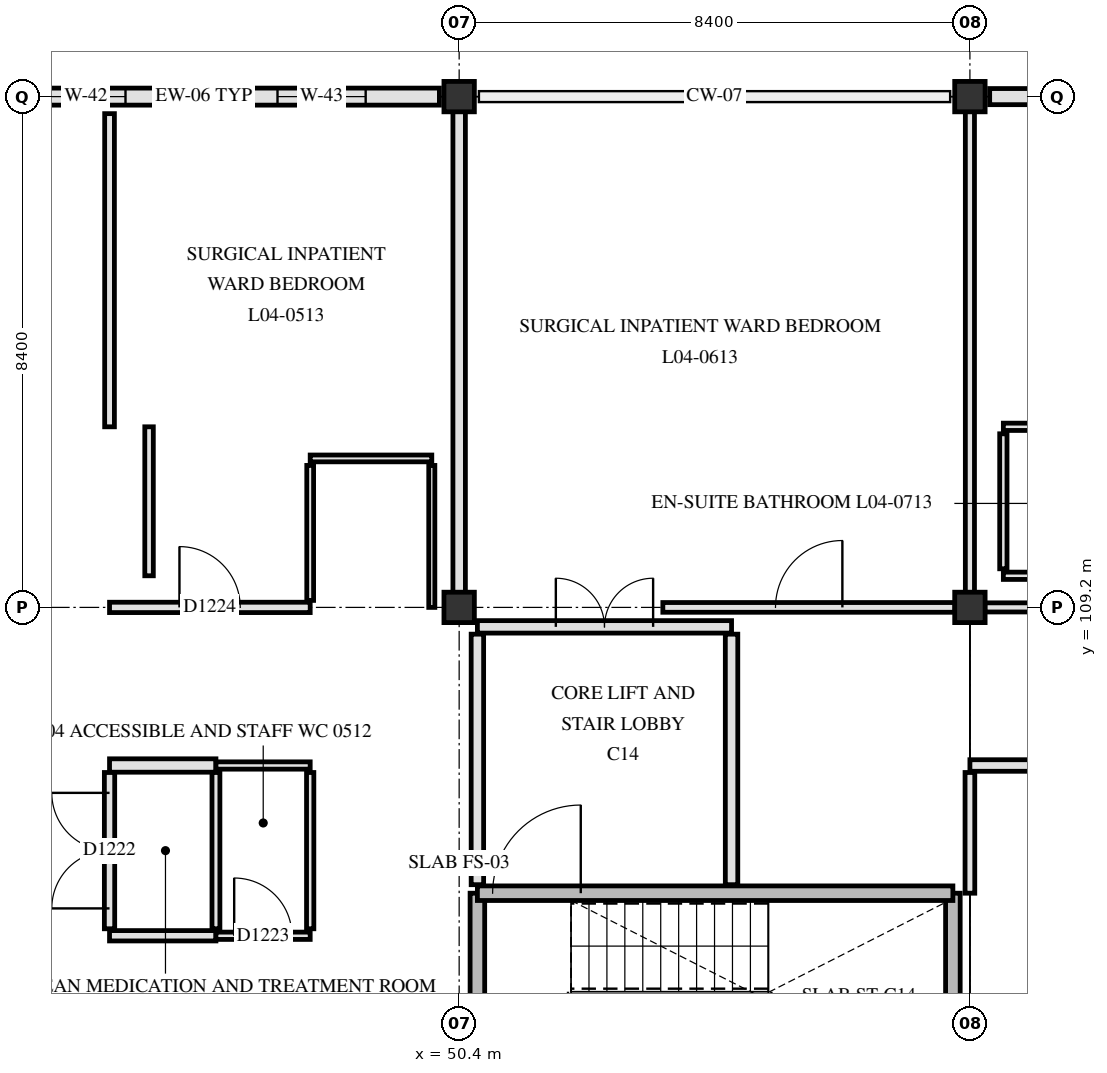
"""IFC4 building model, lengths in metres.
Left out: names, types, materials, properties, quantities, classifications, styles, units other than length and angle.
Written with IfcOpenShell. Run it as: python <this file> out.ifc"""

import sys

from ifc_helpers import new_model, si_unit, direction, frame, frame_2d, origin, origin_2d, place, context, subcontext, project, spatial, rectangle, extrude, element, fill, save


model = new_model("IFC4")
c1 = context("Model", 3, precision=1e-05, world=origin(), true_north=direction((0.0, 1.0)))
c2 = subcontext(c1, "Body", "Model", "MODEL_VIEW")
j1 = project(units=[si_unit("LENGTHUNIT", "METRE"), si_unit("PLANEANGLEUNIT", "RADIAN")], contexts=[c1])
p1 = place(None, origin())
s1 = spatial("IfcSite", under=j1, at=p1, CompositionType="ELEMENT")
p2 = place(p1, origin())
s2 = spatial("IfcBuilding", under=s1, at=p2, CompositionType="ELEMENT")
p3 = place(p2, frame((0.0, 0.0, 18.6)))
s3 = spatial("IfcBuildingStorey", under=s2, at=p3, CompositionType="ELEMENT", Elevation=18.6)
for number, where, z_axis, x_axis in (
    (1, (50.4, 109.2, 0.0), (0.0, 0.0, 1.0), (1.0, 0.0, 0.0)),
    (2, (50.4, 117.6, 0.0), (0.0, 0.0, 1.0), (1.0, 0.0, 0.0)),
    (3, (58.8, 109.2, 0.0), (0.0, 0.0, 1.0), (1.0, 0.0, 0.0)),
    (4, (58.8, 117.6, 0.0), (0.0, 0.0, 1.0), (1.0, 0.0, 0.0)),
):
    element("IfcColumn", number, at=place(p3, frame(where, z_axis=z_axis, x_axis=x_axis)), inside=s3, PredefinedType="COLUMN", context=c2, shape_type="SweptSolid", body=[
        extrude(rectangle(XDim=0.5, YDim=0.5, at=origin_2d()), origin(), (0.0, 0.0, 1.0), 3.9),
    ])
p4 = place(p3, frame((42.325, 117.6, 0.0), z_axis=(0.0, 0.0, 1.0), x_axis=(1.0, 0.0, 0.0)))
e5 = element("IfcWall", 5, at=p4, inside=s3, PredefinedType="SOLIDWALL", context=c2, shape_type="SweptSolid", body=[
    extrude(rectangle(XDim=7.75, YDim=0.28, at=frame_2d((3.875, 0.0))), origin(), (0.0, 0.0, 1.0), 3.3),
])
p5 = place(p4, frame((1.288, 0.0, 0.85)))
e6 = element("IfcOpeningElement", 6, at=p5, cuts=e5, PredefinedType="OPENING", context=c2, shape_type="SweptSolid", body=[
    extrude(rectangle(XDim=1.3, YDim=1.78, at=frame_2d((0.65, 0.89))), frame((0.0, 0.15, 0.0), z_axis=(0.0, -1.0, 0.0), x_axis=(1.0, 0.0, 0.0)), (0.0, 0.0, 1.0), 0.3),
])
p6 = place(p4, frame((5.087, 0.0, 0.85)))
e7 = element("IfcOpeningElement", 7, at=p6, cuts=e5, PredefinedType="OPENING", context=c2, shape_type="SweptSolid", body=[
    extrude(rectangle(XDim=1.45, YDim=1.78, at=frame_2d((0.725, 0.89))), frame((0.0, 0.15, 0.0), z_axis=(0.0, -1.0, 0.0), x_axis=(1.0, 0.0, 0.0)), (0.0, 0.0, 1.0), 0.3),
])
p7 = place(p3, frame((59.125, 117.6, 0.0), z_axis=(0.0, 0.0, 1.0), x_axis=(1.0, 0.0, 0.0)))
e8 = element("IfcWall", 8, at=p7, inside=s3, PredefinedType="SOLIDWALL", context=c2, shape_type="SweptSolid", body=[
    extrude(rectangle(XDim=7.7, YDim=0.265, at=frame_2d((3.85, 0.0))), origin(), (0.0, 0.0, 1.0), 3.31),
])
p8 = place(p7, frame((1.125, 0.0, 0.85)))
e9 = element("IfcOpeningElement", 9, at=p8, cuts=e8, PredefinedType="OPENING", context=c2, shape_type="SweptSolid", body=[
    extrude(rectangle(XDim=1.6, YDim=1.78, at=frame_2d((0.8, 0.89))), frame((0.0, 0.142, 0.0), z_axis=(0.0, -1.0, 0.0), x_axis=(1.0, 0.0, 0.0)), (0.0, 0.0, 1.0), 0.285),
])
p9 = place(p7, frame((4.9, 0.0, 0.85)))
e10 = element("IfcOpeningElement", 10, at=p9, cuts=e8, PredefinedType="OPENING", context=c2, shape_type="SweptSolid", body=[
    extrude(rectangle(XDim=1.75, YDim=1.78, at=frame_2d((0.875, 0.89))), frame((0.0, 0.142, 0.0), z_axis=(0.0, -1.0, 0.0), x_axis=(1.0, 0.0, 0.0)), (0.0, 0.0, 1.0), 0.285),
])
for number, where, z_axis, x_axis in (
    (11, (50.7, 101.18, 0.0), (0.0, 0.0, 1.0), (0.0, 1.0, 0.0)),
    (12, (58.52, 101.18, 0.0), (0.0, 0.0, 1.0), (0.0, 1.0, 0.0)),
):
    element("IfcWall", number, at=place(p3, frame(where, z_axis=z_axis, x_axis=x_axis)), inside=s3, PredefinedType="SHEAR", context=c2, shape_type="SweptSolid", body=[
        extrude(rectangle(XDim=3.32, YDim=0.24, at=frame_2d((1.66, 0.0))), origin(), (0.0, 0.0, 1.0), 3.62),
    ])
p10 = place(p3, frame((50.7, 104.5, 0.0), z_axis=(0.0, 0.0, 1.0), x_axis=(1.0, 0.0, 0.0)))
e13 = element("IfcWall", 13, at=p10, inside=s3, PredefinedType="SHEAR", context=c2, shape_type="SweptSolid", body=[
    extrude(rectangle(XDim=7.82, YDim=0.24, at=frame_2d((3.91, 0.0))), origin(), (0.0, 0.0, 1.0), 3.62),
])
p11 = place(p10, frame((0.25, 0.0, 0.0)))
e14 = element("IfcOpeningElement", 14, at=p11, cuts=e13, PredefinedType="OPENING", context=c2, shape_type="SweptSolid", body=[
    extrude(rectangle(XDim=1.45, YDim=2.2, at=frame_2d((0.725, 1.1))), frame((0.0, 0.13, 0.0), z_axis=(0.0, -1.0, 0.0), x_axis=(1.0, 0.0, 0.0)), (0.0, 0.0, 1.0), 0.26),
])
for number, where, z_axis, x_axis in (
    (15, (54.88, 104.64, 0.0), (0.0, 0.0, 1.0), (0.0, 1.0, 0.0)),
    (16, (50.7, 104.64, 0.0), (0.0, 0.0, 1.0), (0.0, 1.0, 0.0)),
):
    element("IfcWall", number, at=place(p3, frame(where, z_axis=z_axis, x_axis=x_axis)), inside=s3, PredefinedType="PARTITIONING", context=c2, shape_type="SweptSolid", body=[
        extrude(rectangle(XDim=4.12, YDim=0.205, at=frame_2d((2.06, 0.0))), origin(), (0.0, 0.0, 1.0), 3.61),
    ])
p12 = place(p3, frame((50.7, 108.88, 0.0), z_axis=(0.0, 0.0, 1.0), x_axis=(1.0, 0.0, 0.0)))
e17 = element("IfcWall", 17, at=p12, inside=s3, PredefinedType="PARTITIONING", context=c2, shape_type="SweptSolid", body=[
    extrude(rectangle(XDim=4.18, YDim=0.205, at=frame_2d((2.09, 0.0))), origin(), (0.0, 0.0, 1.0), 3.61),
])
p13 = place(p12, frame((1.29, 0.0, 0.0)))
e18 = element("IfcOpeningElement", 18, at=p13, cuts=e17, PredefinedType="OPENING", context=c2, shape_type="SweptSolid", body=[
    extrude(rectangle(XDim=1.6, YDim=2.25, at=frame_2d((0.8, 1.125))), frame((0.0, 0.113, 0.0), z_axis=(0.0, -1.0, 0.0), x_axis=(1.0, 0.0, 0.0)), (0.0, 0.0, 1.0), 0.225),
])
p14 = place(p3, frame((44.65, 103.8, 0.0), z_axis=(0.0, 0.0, 1.0), x_axis=(1.0, 0.0, 0.0)))
e19 = element("IfcWall", 19, at=p14, inside=s3, PredefinedType="PARTITIONING", context=c2, shape_type="SweptSolid", body=[
    extrude(rectangle(XDim=1.75, YDim=0.17, at=frame_2d((0.875, 0.0))), origin(), (0.0, 0.0, 1.0), 3.61),
])
p15 = place(p3, frame((46.4, 103.8, 0.0), z_axis=(0.0, 0.0, 1.0), x_axis=(1.0, 0.0, 0.0)))
e20 = element("IfcWall", 20, at=p15, inside=s3, PredefinedType="PARTITIONING", context=c2, shape_type="SweptSolid", body=[
    extrude(rectangle(XDim=1.55, YDim=0.12, at=frame_2d((0.775, 0.0))), origin(), (0.0, 0.0, 1.0), 3.61),
])
p16 = place(p15, frame((0.3, 0.0, 0.0)))
e21 = element("IfcOpeningElement", 21, at=p16, cuts=e20, PredefinedType="OPENING", context=c2, shape_type="SweptSolid", body=[
    extrude(rectangle(XDim=0.95, YDim=2.1, at=frame_2d((0.475, 1.05))), frame((0.0, 0.07, 0.0), z_axis=(0.0, -1.0, 0.0), x_axis=(1.0, 0.0, 0.0)), (0.0, 0.0, 1.0), 0.14),
])
p17 = place(p3, frame((44.65, 106.6, 0.0), z_axis=(0.0, 0.0, 1.0), x_axis=(1.0, 0.0, 0.0)))
e22 = element("IfcWall", 22, at=p17, inside=s3, PredefinedType="PARTITIONING", context=c2, shape_type="SweptSolid", body=[
    extrude(rectangle(XDim=1.75, YDim=0.22, at=frame_2d((0.875, 0.0))), origin(), (0.0, 0.0, 1.0), 3.3),
])
p18 = place(p3, frame((46.4, 106.6, 0.0), z_axis=(0.0, 0.0, 1.0), x_axis=(1.0, 0.0, 0.0)))
e23 = element("IfcWall", 23, at=p18, inside=s3, PredefinedType="PARTITIONING", context=c2, shape_type="SweptSolid", body=[
    extrude(rectangle(XDim=1.55, YDim=0.12, at=frame_2d((0.775, 0.0))), origin(), (0.0, 0.0, 1.0), 3.61),
])
p19 = place(p3, frame((58.8, 106.6, 0.0), z_axis=(0.0, 0.0, 1.0), x_axis=(1.0, 0.0, 0.0)))
e24 = element("IfcWall", 24, at=p19, inside=s3, PredefinedType="PARTITIONING", context=c2, shape_type="SweptSolid", body=[
    extrude(rectangle(XDim=8.4, YDim=0.19, at=frame_2d((4.2, 0.0))), origin(), (0.0, 0.0, 1.0), 3.26),
])
p20 = place(p19, frame((3.575, 0.0, 0.0)))
e25 = element("IfcOpeningElement", 25, at=p20, cuts=e24, PredefinedType="OPENING", context=c2, shape_type="SweptSolid", body=[
    extrude(rectangle(XDim=1.25, YDim=2.2, at=frame_2d((0.625, 1.1))), frame((0.0, 0.105, 0.0), z_axis=(0.0, -1.0, 0.0), x_axis=(1.0, 0.0, 0.0)), (0.0, 0.0, 1.0), 0.21),
])
p21 = place(p3, frame((44.65, 109.2, 0.0), z_axis=(0.0, 0.0, 1.0), x_axis=(1.0, 0.0, 0.0)))
e26 = element("IfcWall", 26, at=p21, inside=s3, PredefinedType="PARTITIONING", context=c2, shape_type="SweptSolid", body=[
    extrude(rectangle(XDim=3.3, YDim=0.17, at=frame_2d((1.65, 0.0))), origin(), (0.0, 0.0, 1.0), 3.15),
])
p22 = place(p21, frame((1.15, 0.0, 0.0)))
e27 = element("IfcOpeningElement", 27, at=p22, cuts=e26, PredefinedType="OPENING", context=c2, shape_type="SweptSolid", body=[
    extrude(rectangle(XDim=1.0, YDim=2.15, at=frame_2d((0.5, 1.075))), frame((0.0, 0.095, 0.0), z_axis=(0.0, -1.0, 0.0), x_axis=(1.0, 0.0, 0.0)), (0.0, 0.0, 1.0), 0.19),
])
p23 = place(p3, frame((53.75, 109.2, 0.0), z_axis=(0.0, 0.0, 1.0), x_axis=(1.0, 0.0, 0.0)))
e28 = element("IfcWall", 28, at=p23, inside=s3, PredefinedType="PARTITIONING", context=c2, shape_type="SweptSolid", body=[
    extrude(rectangle(XDim=4.805, YDim=0.16, at=frame_2d((2.402, 0.0))), origin(), (0.0, 0.0, 1.0), 3.16),
])
p24 = place(p23, frame((1.853, 0.0, 0.0)))
e29 = element("IfcOpeningElement", 29, at=p24, cuts=e28, PredefinedType="OPENING", context=c2, shape_type="SweptSolid", body=[
    extrude(rectangle(XDim=1.1, YDim=2.15, at=frame_2d((0.55, 1.075))), frame((0.0, 0.09, 0.0), z_axis=(0.0, -1.0, 0.0), x_axis=(1.0, 0.0, 0.0)), (0.0, 0.0, 1.0), 0.18),
])
p25 = place(p3, frame((59.045, 109.2, 0.0), z_axis=(0.0, 0.0, 1.0), x_axis=(1.0, 0.0, 0.0)))
e30 = element("IfcWall", 30, at=p25, inside=s3, PredefinedType="PARTITIONING", context=c2, shape_type="SweptSolid", body=[
    extrude(rectangle(XDim=7.86, YDim=0.15, at=frame_2d((3.93, 0.0))), origin(), (0.0, 0.0, 1.0), 3.16),
])
p26 = place(p25, frame((3.28, 0.0, 0.0)))
e31 = element("IfcOpeningElement", 31, at=p26, cuts=e30, PredefinedType="OPENING", context=c2, shape_type="SweptSolid", body=[
    extrude(rectangle(XDim=1.3, YDim=2.2, at=frame_2d((0.65, 1.1))), frame((0.0, 0.085, 0.0), z_axis=(0.0, -1.0, 0.0), x_axis=(1.0, 0.0, 0.0)), (0.0, 0.0, 1.0), 0.17),
])
p27 = place(p3, frame((59.35, 109.72, 0.0), z_axis=(0.0, 0.0, 1.0), x_axis=(1.0, 0.0, 0.0)))
e32 = element("IfcWall", 32, at=p27, inside=s3, PredefinedType="PARTITIONING", context=c2, shape_type="SweptSolid", body=[
    extrude(rectangle(XDim=2.75, YDim=0.12, at=frame_2d((1.375, 0.0))), origin(), (0.0, 0.0, 1.0), 3.61),
])
p28 = place(p3, frame((47.95, 111.65, 0.0), z_axis=(0.0, 0.0, 1.0), x_axis=(1.0, 0.0, 0.0)))
e33 = element("IfcWall", 33, at=p28, inside=s3, PredefinedType="PARTITIONING", context=c2, shape_type="SweptSolid", body=[
    extrude(rectangle(XDim=2.0, YDim=0.112, at=frame_2d((1.0, 0.0))), origin(), (0.0, 0.0, 1.0), 3.61),
])
p29 = place(p3, frame((59.35, 112.17, 0.0), z_axis=(0.0, 0.0, 1.0), x_axis=(1.0, 0.0, 0.0)))
e34 = element("IfcWall", 34, at=p29, inside=s3, PredefinedType="PARTITIONING", context=c2, shape_type="SweptSolid", body=[
    extrude(rectangle(XDim=2.75, YDim=0.12, at=frame_2d((1.375, 0.0))), origin(), (0.0, 0.0, 1.0), 3.61),
])
p30 = place(p29, frame((0.9, 0.0, 0.0)))
e35 = element("IfcOpeningElement", 35, at=p30, cuts=e34, PredefinedType="OPENING", context=c2, shape_type="SweptSolid", body=[
    extrude(rectangle(XDim=0.95, YDim=2.1, at=frame_2d((0.475, 1.05))), frame((0.0, 0.07, 0.0), z_axis=(0.0, -1.0, 0.0), x_axis=(1.0, 0.0, 0.0)), (0.0, 0.0, 1.0), 0.14),
])
p31 = place(p3, frame((44.65, 103.915, 0.0), z_axis=(0.0, 0.0, 1.0), x_axis=(0.0, 1.0, 0.0)))
e36 = element("IfcWall", 36, at=p31, inside=s3, PredefinedType="PARTITIONING", context=c2, shape_type="SweptSolid", body=[
    extrude(rectangle(XDim=2.57, YDim=0.17, at=frame_2d((1.285, 0.0))), origin(), (0.0, 0.0, 1.0), 3.3),
])
p32 = place(p31, frame((0.335, 0.0, 0.0)))
e37 = element("IfcOpeningElement", 37, at=p32, cuts=e36, PredefinedType="OPENING", context=c2, shape_type="SweptSolid", body=[
    extrude(rectangle(XDim=1.9, YDim=2.3, at=frame_2d((0.95, 1.15))), frame((0.0, 0.095, 0.0), z_axis=(0.0, -1.0, 0.0), x_axis=(1.0, 0.0, 0.0)), (0.0, 0.0, 1.0), 0.19),
])
p33 = place(p3, frame((44.65, 112.17, 0.0), z_axis=(0.0, 0.0, 1.0), x_axis=(0.0, 1.0, 0.0)))
e38 = element("IfcWall", 38, at=p33, inside=s3, PredefinedType="PARTITIONING", context=c2, shape_type="SweptSolid", body=[
    extrude(rectangle(XDim=5.15, YDim=0.16, at=frame_2d((2.575, 0.0))), origin(), (0.0, 0.0, 1.0), 3.3),
])
p34 = place(p3, frame((45.3, 109.72, 0.0), z_axis=(0.0, 0.0, 1.0), x_axis=(0.0, 1.0, 0.0)))
e39 = element("IfcWall", 39, at=p34, inside=s3, PredefinedType="PARTITIONING", context=c2, shape_type="SweptSolid", body=[
    extrude(rectangle(XDim=2.45, YDim=0.14, at=frame_2d((1.225, 0.0))), origin(), (0.0, 0.0, 1.0), 3.3),
])
p35 = place(p3, frame((46.4, 103.915, 0.0), z_axis=(0.0, 0.0, 1.0), x_axis=(0.0, 1.0, 0.0)))
e40 = element("IfcWall", 40, at=p35, inside=s3, PredefinedType="PARTITIONING", context=c2, shape_type="SweptSolid", body=[
    extrude(rectangle(XDim=2.57, YDim=0.13, at=frame_2d((1.285, 0.0))), origin(), (0.0, 0.0, 1.0), 3.3),
])
p36 = place(p3, frame((47.95, 103.915, 0.0), z_axis=(0.0, 0.0, 1.0), x_axis=(0.0, 1.0, 0.0)))
e41 = element("IfcWall", 41, at=p36, inside=s3, PredefinedType="PARTITIONING", context=c2, shape_type="SweptSolid", body=[
    extrude(rectangle(XDim=2.57, YDim=0.12, at=frame_2d((1.285, 0.0))), origin(), (0.0, 0.0, 1.0), 3.3),
])
p37 = place(p3, frame((47.95, 109.315, 0.0), z_axis=(0.0, 0.0, 1.0), x_axis=(0.0, 1.0, 0.0)))
e42 = element("IfcWall", 42, at=p37, inside=s3, PredefinedType="PARTITIONING", context=c2, shape_type="SweptSolid", body=[
    extrude(rectangle(XDim=2.22, YDim=0.112, at=frame_2d((1.11, 0.0))), origin(), (0.0, 0.0, 1.0), 3.61),
])
p38 = place(p3, frame((49.95, 109.2, 0.0), z_axis=(0.0, 0.0, 1.0), x_axis=(0.0, 1.0, 0.0)))
e43 = element("IfcWall", 43, at=p38, inside=s3, PredefinedType="PARTITIONING", context=c2, shape_type="SweptSolid", body=[
    extrude(rectangle(XDim=2.335, YDim=0.1, at=frame_2d((1.167, 0.0))), origin(), (0.0, 0.0, 1.0), 3.15),
])
p39 = place(p3, frame((50.4, 109.445, 0.0), z_axis=(0.0, 0.0, 1.0), x_axis=(0.0, 1.0, 0.0)))
e44 = element("IfcWall", 44, at=p39, inside=s3, PredefinedType="PARTITIONING", context=c2, shape_type="SweptSolid", body=[
    extrude(rectangle(XDim=7.91, YDim=0.205, at=frame_2d((3.955, 0.0))), origin(), (0.0, 0.0, 1.0), 3.25),
])
p40 = place(p3, frame((58.8, 104.5, 0.0), z_axis=(0.0, 0.0, 1.0), x_axis=(0.0, 1.0, 0.0)))
e45 = element("IfcWall", 45, at=p40, inside=s3, PredefinedType="PARTITIONING", context=c2, shape_type="SweptSolid", body=[
    extrude(rectangle(XDim=1.985, YDim=0.16, at=frame_2d((0.993, 0.0))), origin(), (0.0, 0.0, 1.0), 3.26),
])
p41 = place(p3, frame((58.8, 109.445, 0.0), z_axis=(0.0, 0.0, 1.0), x_axis=(0.0, 1.0, 0.0)))
e46 = element("IfcWall", 46, at=p41, inside=s3, PredefinedType="PARTITIONING", context=c2, shape_type="SweptSolid", body=[
    extrude(rectangle(XDim=7.91, YDim=0.15, at=frame_2d((3.955, 0.0))), origin(), (0.0, 0.0, 1.0), 3.26),
])
p42 = place(p3, frame((59.35, 109.835, 0.0), z_axis=(0.0, 0.0, 1.0), x_axis=(0.0, 1.0, 0.0)))
e47 = element("IfcWall", 47, at=p42, inside=s3, PredefinedType="PARTITIONING", context=c2, shape_type="SweptSolid", body=[
    extrude(rectangle(XDim=2.22, YDim=0.12, at=frame_2d((1.11, 0.0))), origin(), (0.0, 0.0, 1.0), 3.31),
])
p43 = place(p5, origin())
e48 = element("IfcWindow", 48, at=p43, inside=s3, PartitioningType="SINGLE_PANEL", PredefinedType="WINDOW", context=c2, shape_type="SweptSolid", body=[
    extrude(rectangle(XDim=1.3, YDim=1.78, at=frame_2d((0.65, 0.89))), frame((0.0, 0.03, 0.0), z_axis=(0.0, -1.0, 0.0), x_axis=(1.0, 0.0, 0.0)), (0.0, 0.0, 1.0), 0.06),
])
fill(e6, e48)
p44 = place(p6, origin())
e49 = element("IfcWindow", 49, at=p44, inside=s3, PartitioningType="SINGLE_PANEL", PredefinedType="WINDOW", context=c2, shape_type="SweptSolid", body=[
    extrude(rectangle(XDim=1.45, YDim=1.78, at=frame_2d((0.725, 0.89))), frame((0.0, 0.03, 0.0), z_axis=(0.0, -1.0, 0.0), x_axis=(1.0, 0.0, 0.0)), (0.0, 0.0, 1.0), 0.06),
])
fill(e7, e49)
p45 = place(p11, origin())
e50 = element("IfcDoor", 50, at=p45, inside=s3, OperationType="SINGLE_SWING_RIGHT", PredefinedType="DOOR", context=c2, shape_type="SweptSolid", body=[
    extrude(rectangle(XDim=1.45, YDim=2.2, at=frame_2d((0.725, 1.1))), frame((0.0, 0.025, 0.0), z_axis=(0.0, -1.0, 0.0), x_axis=(1.0, 0.0, 0.0)), (0.0, 0.0, 1.0), 0.05),
])
fill(e14, e50)
p46 = place(p13, origin())
e51 = element("IfcDoor", 51, at=p46, inside=s3, OperationType="DOUBLE_SWING_LEFT", PredefinedType="DOOR", context=c2, shape_type="SweptSolid", body=[
    extrude(rectangle(XDim=1.6, YDim=2.25, at=frame_2d((0.8, 1.125))), frame((0.0, 0.025, 0.0), z_axis=(0.0, -1.0, 0.0), x_axis=(1.0, 0.0, 0.0)), (0.0, 0.0, 1.0), 0.05),
])
fill(e18, e51)
p47 = place(p32, origin())
e52 = element("IfcDoor", 52, at=p47, inside=s3, OperationType="DOUBLE_SWING_LEFT", PredefinedType="DOOR", context=c2, shape_type="SweptSolid", body=[
    extrude(rectangle(XDim=1.9, YDim=2.3, at=frame_2d((0.95, 1.15))), frame((0.0, 0.025, 0.0), z_axis=(0.0, -1.0, 0.0), x_axis=(1.0, 0.0, 0.0)), (0.0, 0.0, 1.0), 0.05),
])
fill(e37, e52)
p48 = place(p16, origin())
e53 = element("IfcDoor", 53, at=p48, inside=s3, OperationType="SINGLE_SWING_LEFT", PredefinedType="DOOR", context=c2, shape_type="SweptSolid", body=[
    extrude(rectangle(XDim=0.95, YDim=2.1, at=frame_2d((0.475, 1.05))), frame((0.0, 0.025, 0.0), z_axis=(0.0, -1.0, 0.0), x_axis=(1.0, 0.0, 0.0)), (0.0, 0.0, 1.0), 0.05),
])
fill(e21, e53)
p49 = place(p22, origin())
e54 = element("IfcDoor", 54, at=p49, inside=s3, OperationType="SINGLE_SWING_LEFT", PredefinedType="DOOR", context=c2, shape_type="SweptSolid", body=[
    extrude(rectangle(XDim=1.0, YDim=2.15, at=frame_2d((0.5, 1.075))), frame((0.0, 0.025, 0.0), z_axis=(0.0, -1.0, 0.0), x_axis=(1.0, 0.0, 0.0)), (0.0, 0.0, 1.0), 0.05),
])
fill(e27, e54)
p50 = place(p24, origin())
e55 = element("IfcDoor", 55, at=p50, inside=s3, OperationType="SINGLE_SWING_RIGHT", PredefinedType="DOOR", context=c2, shape_type="SweptSolid", body=[
    extrude(rectangle(XDim=1.1, YDim=2.15, at=frame_2d((0.55, 1.075))), frame((0.0, 0.025, 0.0), z_axis=(0.0, -1.0, 0.0), x_axis=(1.0, 0.0, 0.0)), (0.0, 0.0, 1.0), 0.05),
])
fill(e29, e55)
save(model, sys.argv[1])
